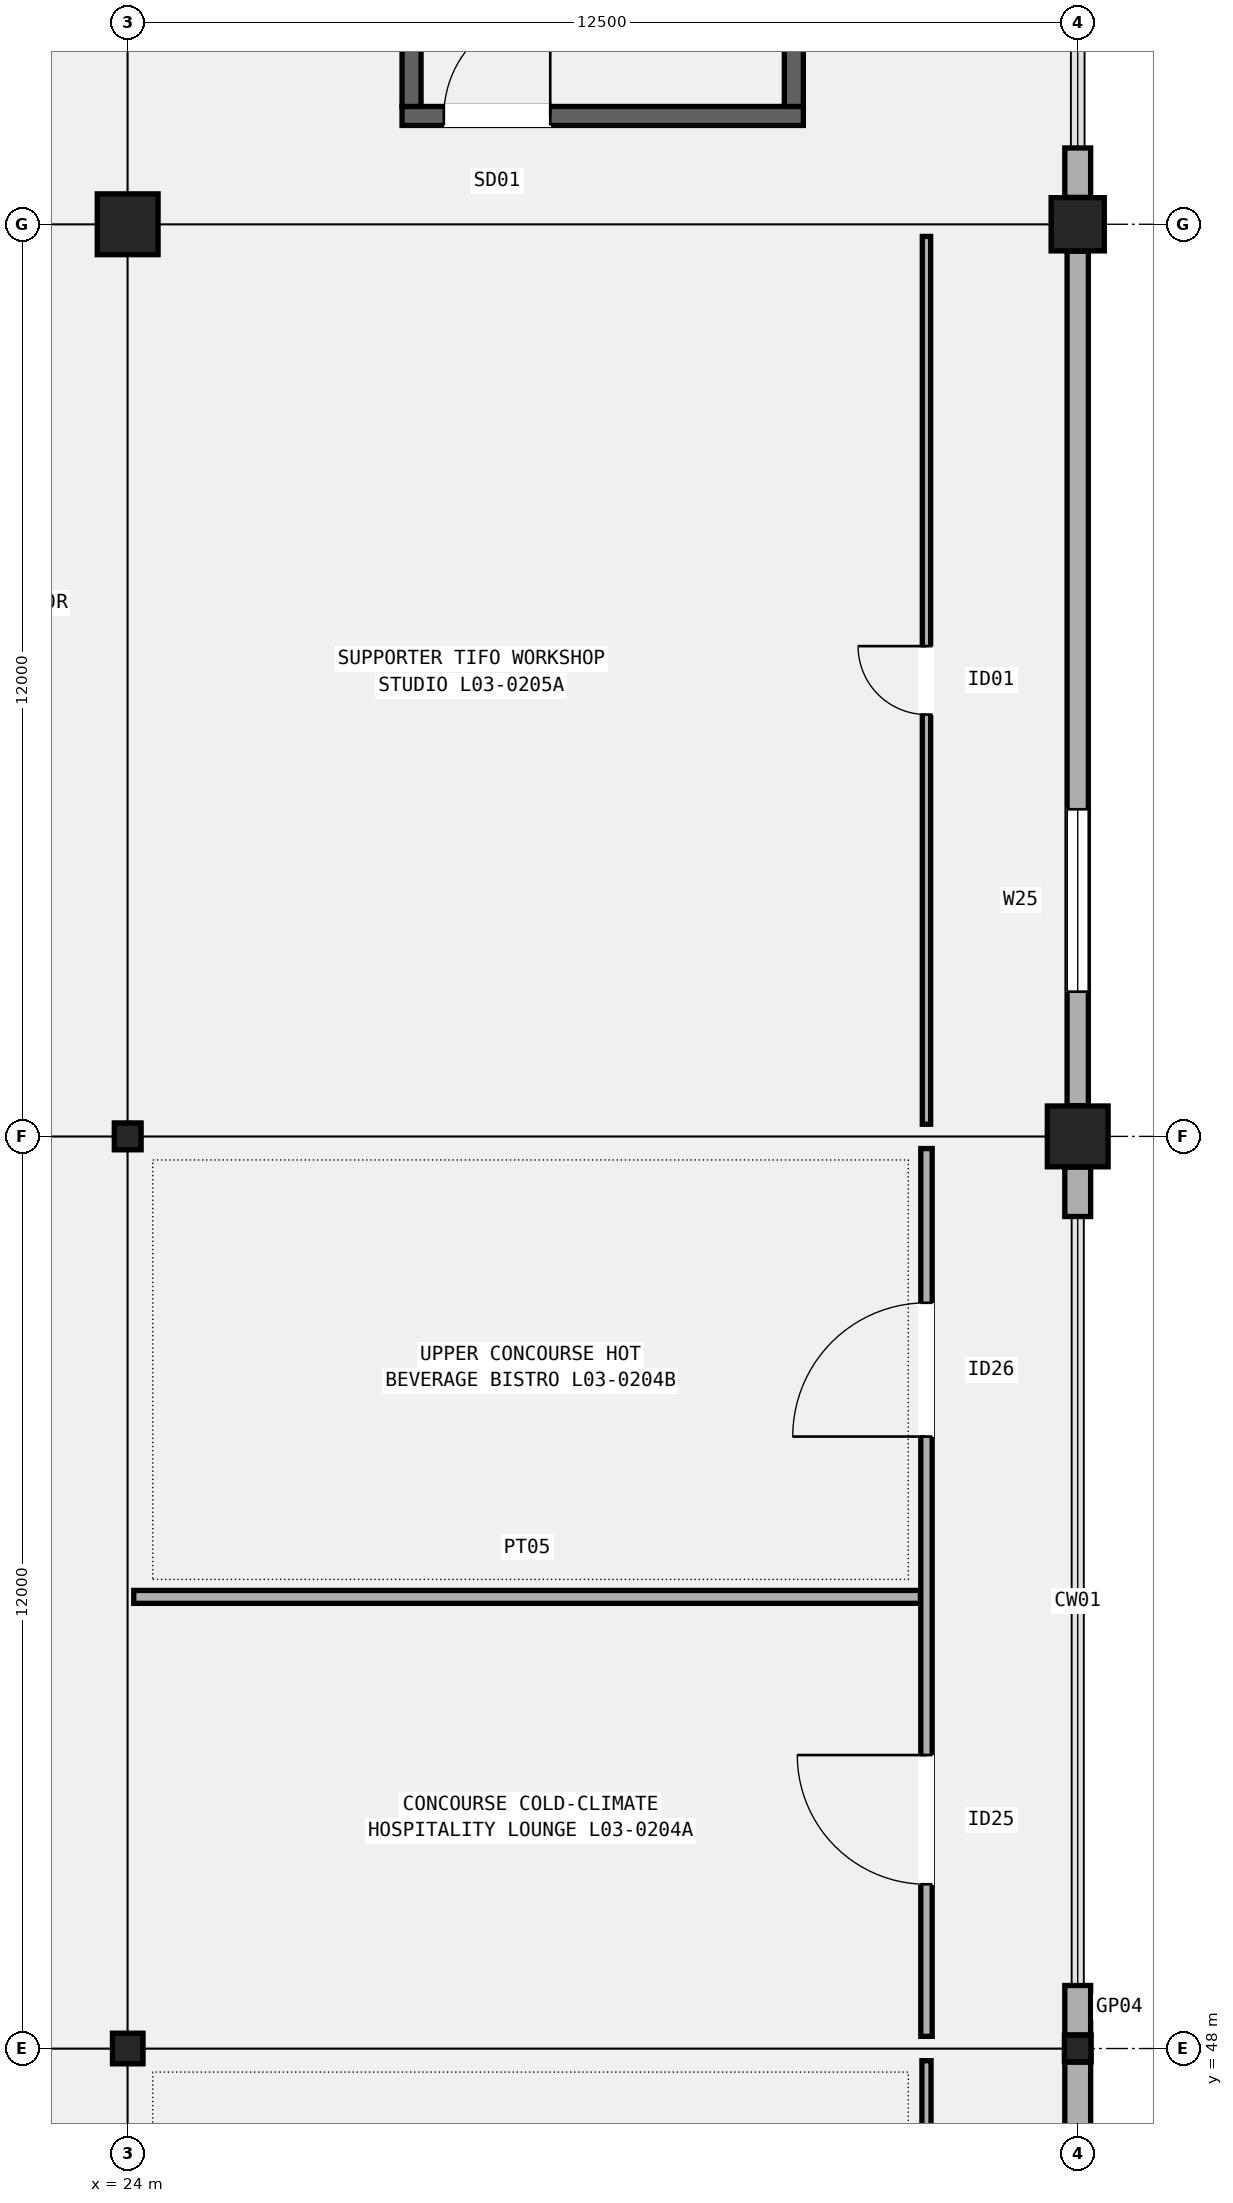
"""IFC4 building model, lengths in metres.
Left out: names, types, materials, properties, quantities, classifications, styles, units other than length and angle.
Written with IfcOpenShell. Run it as: python <this file> out.ifc"""

import sys

from ifc_helpers import new_model, si_unit, direction, frame, frame_2d, origin, origin_2d, place, context, subcontext, project, spatial, rectangle, hollow_rectangle, extrude, element, fill, save


model = new_model("IFC4")
c1 = context("Model", 3, precision=1e-05, world=origin(), true_north=direction((0.0, 1.0)))
c2 = subcontext(c1, "Body", "Model", "MODEL_VIEW")
j1 = project(units=[si_unit("LENGTHUNIT", "METRE"), si_unit("PLANEANGLEUNIT", "RADIAN")], contexts=[c1])
p1 = place(None, origin())
s1 = spatial("IfcSite", under=j1, at=p1, CompositionType="ELEMENT")
p2 = place(p1, origin())
s2 = spatial("IfcBuilding", under=s1, at=p2, CompositionType="ELEMENT")
p3 = place(p2, frame((0.0, 0.0, 15.3)))
s3 = spatial("IfcBuildingStorey", under=s2, at=p3, CompositionType="ELEMENT", Elevation=15.3)
p4 = place(p3, frame((24.0, 48.0, 0.0), z_axis=(0.0, 0.0, 1.0), x_axis=(1.0, 0.0, 0.0)))
e1 = element("IfcColumn", 1, at=p4, inside=s3, PredefinedType="COLUMN", context=c2, shape_type="SweptSolid", body=[
    extrude(hollow_rectangle(XDim=0.4, YDim=0.4, WallThickness=0.016, InnerFilletRadius=0.016, OuterFilletRadius=0.032, at=origin_2d()), origin(), (0.0, 0.0, 1.0), 5.1),
])
p5 = place(p3, frame((24.0, 60.0, 0.0), z_axis=(0.0, 0.0, 1.0), x_axis=(1.0, 0.0, 0.0)))
e2 = element("IfcColumn", 2, at=p5, inside=s3, PredefinedType="COLUMN", context=c2, shape_type="SweptSolid", body=[
    extrude(hollow_rectangle(XDim=0.35, YDim=0.35, WallThickness=0.016, InnerFilletRadius=0.016, OuterFilletRadius=0.032, at=origin_2d()), origin(), (0.0, 0.0, 1.0), 5.1),
])
p6 = place(p3, frame((24.0, 72.0, 0.0), z_axis=(0.0, 0.0, 1.0), x_axis=(1.0, 0.0, 0.0)))
e3 = element("IfcColumn", 3, at=p6, inside=s3, PredefinedType="COLUMN", context=c2, shape_type="SweptSolid", body=[
    extrude(rectangle(XDim=0.8, YDim=0.8, at=origin_2d()), origin(), (0.0, 0.0, 1.0), 5.1),
])
p7 = place(p3, frame((36.5, 48.0, 0.0), z_axis=(0.0, 0.0, 1.0), x_axis=(1.0, 0.0, 0.0)))
e4 = element("IfcColumn", 4, at=p7, inside=s3, PredefinedType="COLUMN", context=c2, shape_type="SweptSolid", body=[
    extrude(hollow_rectangle(XDim=0.35, YDim=0.35, WallThickness=0.016, InnerFilletRadius=0.016, OuterFilletRadius=0.032, at=origin_2d()), origin(), (0.0, 0.0, 1.0), 5.1),
])
p8 = place(p3, frame((36.5, 60.0, 0.0), z_axis=(0.0, 0.0, 1.0), x_axis=(1.0, 0.0, 0.0)))
e5 = element("IfcColumn", 5, at=p8, inside=s3, PredefinedType="COLUMN", context=c2, shape_type="SweptSolid", body=[
    extrude(rectangle(XDim=0.8, YDim=0.8, at=origin_2d()), origin(), (0.0, 0.0, 1.0), 5.1),
])
p9 = place(p3, frame((36.5, 72.0, 0.0), z_axis=(0.0, 0.0, 1.0), x_axis=(1.0, 0.0, 0.0)))
e6 = element("IfcColumn", 6, at=p9, inside=s3, PredefinedType="COLUMN", context=c2, shape_type="SweptSolid", body=[
    extrude(rectangle(XDim=0.7, YDim=0.7, at=origin_2d()), origin(), (0.0, 0.0, 1.0), 5.1),
])
p10 = place(p3, frame((36.5, 36.204, 0.0), z_axis=(0.0, 0.0, 1.0), x_axis=(0.0, 1.0, 0.0)))
e7 = element("IfcWall", 7, at=p10, inside=s3, PredefinedType="SOLIDWALL", context=c2, shape_type="SweptSolid", body=[
    extrude(rectangle(XDim=11.617, YDim=0.34, at=frame_2d((5.809, 0.0))), origin(), (0.0, 0.0, 1.0), 4.06),
])
p11 = place(p10, frame((1.5, 0.0, 0.95)))
e8 = element("IfcOpeningElement", 8, at=p11, cuts=e7, PredefinedType="OPENING", context=c2, shape_type="SweptSolid", body=[
    extrude(rectangle(XDim=2.4, YDim=2.05, at=frame_2d((1.2, 1.025))), frame((0.0, 0.18, 0.0), z_axis=(0.0, -1.0, 0.0), x_axis=(1.0, 0.0, 0.0)), (0.0, 0.0, 1.0), 0.36),
])
p12 = place(p3, frame((36.5, 48.179, 0.0), z_axis=(0.0, 0.0, 1.0), x_axis=(0.0, 1.0, 0.0)))
e9 = element("IfcWall", 9, at=p12, inside=s3, PredefinedType="SOLIDWALL", context=c2, shape_type="SweptSolid", body=[
    extrude(rectangle(XDim=0.65, YDim=0.34, at=frame_2d((0.325, 0.0))), origin(), (0.0, 0.0, 1.0), 4.16),
])
p13 = place(p3, frame((36.5, 58.946, 0.0), z_axis=(0.0, 0.0, 1.0), x_axis=(0.0, 1.0, 0.0)))
e10 = element("IfcWall", 10, at=p13, inside=s3, PredefinedType="SOLIDWALL", context=c2, shape_type="SweptSolid", body=[
    extrude(rectangle(XDim=0.65, YDim=0.34, at=frame_2d((0.325, 0.0))), origin(), (0.0, 0.0, 1.0), 4.16),
])
p14 = place(p3, frame((36.5, 60.404, 0.0), z_axis=(0.0, 0.0, 1.0), x_axis=(0.0, 1.0, 0.0)))
e11 = element("IfcWall", 11, at=p14, inside=s3, PredefinedType="SOLIDWALL", context=c2, shape_type="SweptSolid", body=[
    extrude(rectangle(XDim=11.242, YDim=0.28, at=frame_2d((5.621, 0.0))), origin(), (0.0, 0.0, 1.0), 4.172),
])
p15 = place(p14, frame((1.5, 0.0, 0.95)))
e12 = element("IfcOpeningElement", 12, at=p15, cuts=e11, PredefinedType="OPENING", context=c2, shape_type="SweptSolid", body=[
    extrude(rectangle(XDim=2.4, YDim=2.45, at=frame_2d((1.2, 1.225))), frame((0.0, 0.15, 0.0), z_axis=(0.0, -1.0, 0.0), x_axis=(1.0, 0.0, 0.0)), (0.0, 0.0, 1.0), 0.3),
])
p16 = place(p3, frame((36.5, 72.354, 0.0), z_axis=(0.0, 0.0, 1.0), x_axis=(0.0, 1.0, 0.0)))
e13 = element("IfcWall", 13, at=p16, inside=s3, PredefinedType="SOLIDWALL", context=c2, shape_type="SweptSolid", body=[
    extrude(rectangle(XDim=0.65, YDim=0.34, at=frame_2d((0.325, 0.0))), origin(), (0.0, 0.0, 1.0), 4.06),
])
p17 = place(p3, frame((27.61, 73.425, 0.0), z_axis=(0.0, 0.0, 1.0), x_axis=(1.0, 0.0, 0.0)))
e14 = element("IfcWall", 14, at=p17, inside=s3, PredefinedType="SHEAR", context=c2, shape_type="SweptSolid", body=[
    extrude(rectangle(XDim=5.28, YDim=0.25, at=frame_2d((2.64, 0.0))), origin(), (0.0, 0.0, 1.0), 4.86),
])
p18 = place(p17, frame((0.55, 0.0, 0.0)))
e15 = element("IfcOpeningElement", 15, at=p18, cuts=e14, PredefinedType="OPENING", context=c2, shape_type="SweptSolid", body=[
    extrude(rectangle(XDim=1.4, YDim=2.15, at=frame_2d((0.7, 1.075))), frame((0.0, 0.135, 0.0), z_axis=(0.0, -1.0, 0.0), x_axis=(1.0, 0.0, 0.0)), (0.0, 0.0, 1.0), 0.27),
])
for number, where, z_axis, x_axis in (
    (16, (27.735, 73.55, 0.0), (0.0, 0.0, 1.0), (0.0, 1.0, 0.0)),
    (17, (32.765, 73.55, 0.0), (0.0, 0.0, 1.0), (0.0, 1.0, 0.0)),
):
    element("IfcWall", number, at=place(p3, frame(where, z_axis=z_axis, x_axis=x_axis)), inside=s3, PredefinedType="SHEAR", context=c2, shape_type="SweptSolid", body=[
        extrude(rectangle(XDim=8.9, YDim=0.25, at=frame_2d((4.45, 0.0))), origin(), (0.0, 0.0, 1.0), 4.86),
    ])
p19 = place(p3, frame((34.51, 37.92, 0.0), z_axis=(0.0, 0.0, 1.0), x_axis=(0.0, 1.0, 0.0)))
e18 = element("IfcWall", 18, at=p19, inside=s3, PredefinedType="PARTITIONING", context=c2, shape_type="SweptSolid", body=[
    extrude(rectangle(XDim=9.92, YDim=0.12, at=frame_2d((4.96, 0.0))), origin(), (0.0, 0.0, 1.0), 4.22),
])
p20 = place(p19, frame((4.135, 0.0, 0.0)))
e19 = element("IfcOpeningElement", 19, at=p20, cuts=e18, PredefinedType="OPENING", context=c2, shape_type="SweptSolid", body=[
    extrude(rectangle(XDim=1.65, YDim=2.28, at=frame_2d((0.825, 1.14))), frame((0.0, 0.07, 0.0), z_axis=(0.0, -1.0, 0.0), x_axis=(1.0, 0.0, 0.0)), (0.0, 0.0, 1.0), 0.14),
])
p21 = place(p3, frame((34.51, 48.16, 0.0), z_axis=(0.0, 0.0, 1.0), x_axis=(0.0, 1.0, 0.0)))
e20 = element("IfcWall", 20, at=p21, inside=s3, PredefinedType="PARTITIONING", context=c2, shape_type="SweptSolid", body=[
    extrude(rectangle(XDim=11.68, YDim=0.15, at=frame_2d((5.84, 0.0))), origin(), (0.0, 0.0, 1.0), 4.22),
])
p22 = place(p21, frame((2.001, 0.0, 0.0)))
e21 = element("IfcOpeningElement", 21, at=p22, cuts=e20, PredefinedType="OPENING", context=c2, shape_type="SweptSolid", body=[
    extrude(rectangle(XDim=1.7, YDim=2.32, at=frame_2d((0.85, 1.16))), frame((0.0, 0.085, 0.0), z_axis=(0.0, -1.0, 0.0), x_axis=(1.0, 0.0, 0.0)), (0.0, 0.0, 1.0), 0.17),
])
p23 = place(p21, frame((7.891, 0.0, 0.0)))
e22 = element("IfcOpeningElement", 22, at=p23, cuts=e20, PredefinedType="OPENING", context=c2, shape_type="SweptSolid", body=[
    extrude(rectangle(XDim=1.76, YDim=2.3, at=frame_2d((0.88, 1.15))), frame((0.0, 0.085, 0.0), z_axis=(0.0, -1.0, 0.0), x_axis=(1.0, 0.0, 0.0)), (0.0, 0.0, 1.0), 0.17),
])
p24 = place(p3, frame((24.08, 53.942, 0.0), z_axis=(0.0, 0.0, 1.0), x_axis=(1.0, 0.0, 0.0)))
e23 = element("IfcWall", 23, at=p24, inside=s3, PredefinedType="PARTITIONING", context=c2, shape_type="SweptSolid", body=[
    extrude(rectangle(XDim=10.35, YDim=0.17, at=frame_2d((5.175, 0.0))), origin(), (0.0, 0.0, 1.0), 4.22),
])
p25 = place(p3, frame((34.51, 60.16, 0.0), z_axis=(0.0, 0.0, 1.0), x_axis=(0.0, 1.0, 0.0)))
e24 = element("IfcWall", 24, at=p25, inside=s3, PredefinedType="PARTITIONING", context=c2, shape_type="SweptSolid", body=[
    extrude(rectangle(XDim=11.68, YDim=0.11, at=frame_2d((5.84, 0.0))), origin(), (0.0, 0.0, 1.0), 4.22),
])
p26 = place(p25, frame((5.39, 0.0, 0.0)))
e25 = element("IfcOpeningElement", 25, at=p26, cuts=e24, PredefinedType="OPENING", context=c2, shape_type="SweptSolid", body=[
    extrude(rectangle(XDim=0.9, YDim=2.06, at=frame_2d((0.45, 1.03))), frame((0.0, 0.065, 0.0), z_axis=(0.0, -1.0, 0.0), x_axis=(1.0, 0.0, 0.0)), (0.0, 0.0, 1.0), 0.13),
])
p27 = place(p15, origin())
e26 = element("IfcWindow", 26, at=p27, inside=s3, PartitioningType="SINGLE_PANEL", PredefinedType="WINDOW", context=c2, shape_type="SweptSolid", body=[
    extrude(rectangle(XDim=2.4, YDim=2.45, at=frame_2d((1.2, 1.225))), frame((0.0, 0.03, 0.0), z_axis=(0.0, -1.0, 0.0), x_axis=(1.0, 0.0, 0.0)), (0.0, 0.0, 1.0), 0.06),
])
fill(e12, e26)
p28 = place(p18, origin())
e27 = element("IfcDoor", 27, at=p28, inside=s3, OperationType="SINGLE_SWING_RIGHT", PredefinedType="DOOR", context=c2, shape_type="SweptSolid", body=[
    extrude(rectangle(XDim=1.4, YDim=2.15, at=frame_2d((0.7, 1.075))), frame((0.0, 0.025, 0.0), z_axis=(0.0, -1.0, 0.0), x_axis=(1.0, 0.0, 0.0)), (0.0, 0.0, 1.0), 0.05),
])
fill(e15, e27)
p29 = place(p22, origin())
e28 = element("IfcDoor", 28, at=p29, inside=s3, OperationType="SINGLE_SWING_RIGHT", PredefinedType="DOOR", context=c2, shape_type="SweptSolid", body=[
    extrude(rectangle(XDim=1.7, YDim=2.32, at=frame_2d((0.85, 1.16))), frame((0.0, 0.025, 0.0), z_axis=(0.0, -1.0, 0.0), x_axis=(1.0, 0.0, 0.0)), (0.0, 0.0, 1.0), 0.05),
])
fill(e21, e28)
p30 = place(p23, origin())
e29 = element("IfcDoor", 29, at=p30, inside=s3, OperationType="SINGLE_SWING_LEFT", PredefinedType="DOOR", context=c2, shape_type="SweptSolid", body=[
    extrude(rectangle(XDim=1.76, YDim=2.3, at=frame_2d((0.88, 1.15))), frame((0.0, 0.025, 0.0), z_axis=(0.0, -1.0, 0.0), x_axis=(1.0, 0.0, 0.0)), (0.0, 0.0, 1.0), 0.05),
])
fill(e22, e29)
p31 = place(p26, origin())
e30 = element("IfcDoor", 30, at=p31, inside=s3, OperationType="SINGLE_SWING_RIGHT", PredefinedType="DOOR", context=c2, shape_type="SweptSolid", body=[
    extrude(rectangle(XDim=0.9, YDim=2.06, at=frame_2d((0.45, 1.03))), frame((0.0, 0.025, 0.0), z_axis=(0.0, -1.0, 0.0), x_axis=(1.0, 0.0, 0.0)), (0.0, 0.0, 1.0), 0.05),
])
fill(e25, e30)
save(model, sys.argv[1])
